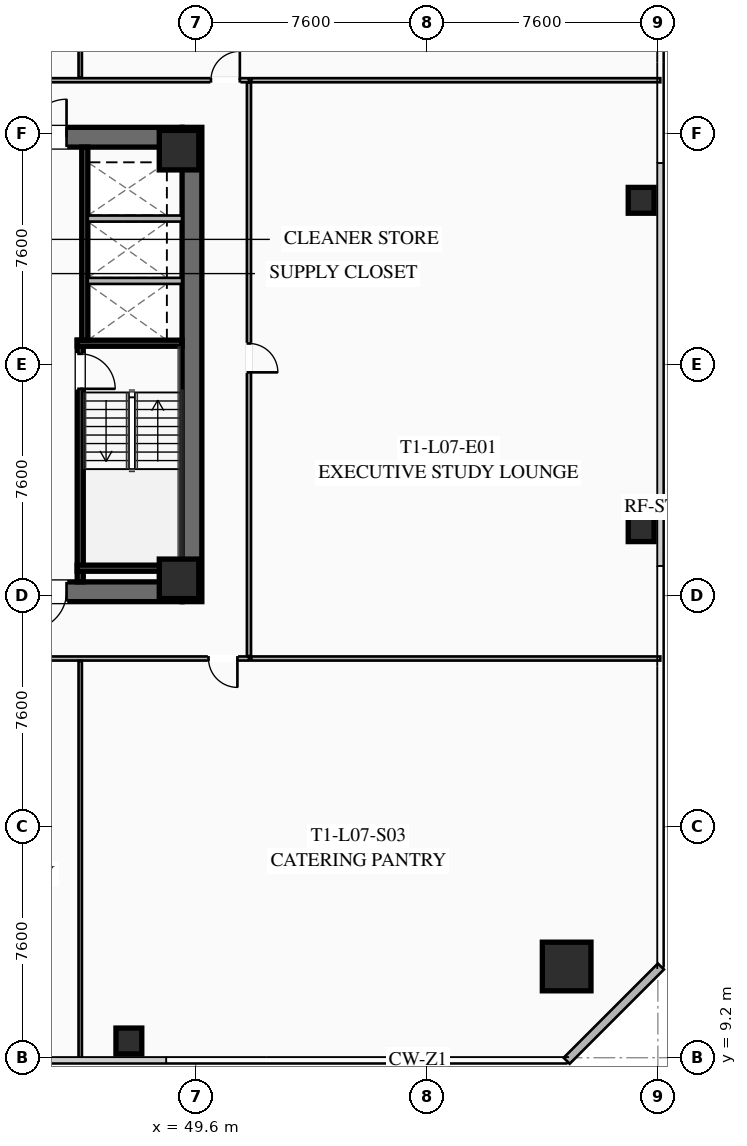
"""IFC4 building model, lengths in metres.
Left out: names, types, materials, properties, quantities, classifications, styles, units other than length and angle.
Written with IfcOpenShell. Run it as: python <this file> out.ifc"""

import sys

from ifc_helpers import new_model, si_unit, direction, frame, frame_2d, origin, origin_2d, place, context, subcontext, project, spatial, rectangle, hollow_rectangle, extrude, element, fill, save


model = new_model("IFC4")
c1 = context("Model", 3, precision=1e-05, world=origin(), true_north=direction((0.0, 1.0)))
c2 = subcontext(c1, "Body", "Model", "MODEL_VIEW")
j1 = project(units=[si_unit("LENGTHUNIT", "METRE"), si_unit("PLANEANGLEUNIT", "RADIAN")], contexts=[c1])
p1 = place(None, origin())
s1 = spatial("IfcSite", under=j1, at=p1, CompositionType="ELEMENT")
p2 = place(p1, origin())
s2 = spatial("IfcBuilding", under=s1, at=p2, CompositionType="ELEMENT")
p3 = place(p2, frame((0.0, 0.0, 31.7)))
s3 = spatial("IfcBuildingStorey", under=s2, at=p3, CompositionType="ELEMENT", Elevation=31.7)
p4 = place(p3, frame((49.475, 39.8, 0.0), z_axis=(0.0, 0.0, 1.0), x_axis=(0.0, -1.0, 0.0)))
e1 = element("IfcWall", 1, at=p4, inside=s3, PredefinedType="SHEAR", context=c2, shape_type="SweptSolid", body=[
    extrude(rectangle(XDim=15.6, YDim=0.65, at=frame_2d((7.8, 0.0))), origin(), (0.0, 0.0, 1.0), 3.55),
])
p5 = place(p3, frame((49.15, 24.525, 0.0), z_axis=(0.0, 0.0, 1.0), x_axis=(-1.0, 0.0, 0.0)))
e2 = element("IfcWall", 2, at=p5, inside=s3, PredefinedType="SHEAR", context=c2, shape_type="SweptSolid", body=[
    extrude(rectangle(XDim=14.3, YDim=0.65, at=frame_2d((7.15, 0.0))), origin(), (0.0, 0.0, 1.0), 3.55),
])
p6 = place(p5, frame((8.85, 0.0, 0.0)))
e3 = element("IfcOpeningElement", 3, at=p6, cuts=e2, PredefinedType="OPENING", context=c2, shape_type="SweptSolid", body=[
    extrude(rectangle(XDim=1.25, YDim=2.25, at=frame_2d((0.625, 1.125))), frame((0.0, 0.335, 0.0), z_axis=(0.0, -1.0, 0.0), x_axis=(1.0, 0.0, 0.0)), (0.0, 0.0, 1.0), 0.67),
])
p7 = place(p5, frame((3.8, 0.0, 0.0)))
e4 = element("IfcOpeningElement", 4, at=p7, cuts=e2, PredefinedType="OPENING", context=c2, shape_type="SweptSolid", body=[
    extrude(rectangle(XDim=1.25, YDim=2.25, at=frame_2d((0.625, 1.125))), frame((0.0, 0.335, 0.0), z_axis=(0.0, -1.0, 0.0), x_axis=(1.0, 0.0, 0.0)), (0.0, 0.0, 1.0), 0.67),
])
p8 = place(p3, frame((34.85, 39.475, 0.0), z_axis=(0.0, 0.0, 1.0), x_axis=(1.0, 0.0, 0.0)))
e5 = element("IfcWall", 5, at=p8, inside=s3, PredefinedType="SHEAR", context=c2, shape_type="SweptSolid", body=[
    extrude(rectangle(XDim=14.3, YDim=0.65, at=frame_2d((7.15, 0.0))), origin(), (0.0, 0.0, 1.0), 3.55),
])
p9 = place(p8, frame((4.2, 0.0, 0.0)))
e6 = element("IfcOpeningElement", 6, at=p9, cuts=e5, PredefinedType="OPENING", context=c2, shape_type="SweptSolid", body=[
    extrude(rectangle(XDim=1.25, YDim=2.25, at=frame_2d((0.625, 1.125))), frame((0.0, 0.335, 0.0), z_axis=(0.0, -1.0, 0.0), x_axis=(1.0, 0.0, 0.0)), (0.0, 0.0, 1.0), 0.67),
])
p10 = place(p8, frame((9.25, 0.0, 0.0)))
e7 = element("IfcOpeningElement", 7, at=p10, cuts=e5, PredefinedType="OPENING", context=c2, shape_type="SweptSolid", body=[
    extrude(rectangle(XDim=1.25, YDim=2.25, at=frame_2d((0.625, 1.125))), frame((0.0, 0.335, 0.0), z_axis=(0.0, -1.0, 0.0), x_axis=(1.0, 0.0, 0.0)), (0.0, 0.0, 1.0), 0.67),
])
for number, where, z_axis, x_axis in (
    (8, (49.05, 24.95, 0.0), (0.0, 0.0, 1.0), (1.0, 0.0, 0.0)),
    (9, (49.05, 39.05, 0.0), (0.0, 0.0, 1.0), (1.0, 0.0, 0.0)),
):
    element("IfcColumn", number, at=place(p3, frame(where, z_axis=z_axis, x_axis=x_axis)), inside=s3, PredefinedType="COLUMN", context=c2, shape_type="SweptSolid", body=[
        extrude(hollow_rectangle(XDim=1.3, YDim=1.3, WallThickness=0.05, at=origin_2d()), origin(), (0.0, 0.0, 1.0), 3.35),
    ])
p11 = place(p3, frame((61.8, 12.2, 0.0), z_axis=(0.0, 0.0, 1.0), x_axis=(1.0, 0.0, 0.0)))
e10 = element("IfcColumn", 10, at=p11, inside=s3, PredefinedType="COLUMN", context=c2, shape_type="SweptSolid", body=[
    extrude(hollow_rectangle(XDim=1.6, YDim=1.6, WallThickness=0.06, at=origin_2d()), origin(), (0.0, 0.0, 1.0), 3.35),
])
for number, where, z_axis, x_axis in (
    (11, (47.4, 9.75, 0.0), (0.0, 0.0, 1.0), (1.0, 0.0, 0.0)),
    (12, (64.25, 26.6, 0.0), (0.0, 0.0, 1.0), (1.0, 0.0, 0.0)),
    (13, (64.25, 37.4, 0.0), (0.0, 0.0, 1.0), (1.0, 0.0, 0.0)),
):
    element("IfcColumn", number, at=place(p3, frame(where, z_axis=z_axis, x_axis=x_axis)), inside=s3, PredefinedType="COLUMN", context=c2, shape_type="SweptSolid", body=[
        extrude(hollow_rectangle(XDim=0.85, YDim=0.85, WallThickness=0.035, at=origin_2d()), origin(), (0.0, 0.0, 1.0), 3.35),
    ])
p12 = place(p3, frame((64.9, 12.2, 0.0), z_axis=(0.0, 0.0, 1.0), x_axis=(-0.707106781187, -0.707106781187, 0.0)))
e14 = element("IfcWall", 14, at=p12, inside=s3, PredefinedType="SOLIDWALL", context=c2, shape_type="SweptSolid", body=[
    extrude(rectangle(XDim=4.384, YDim=0.28, at=frame_2d((2.192, 0.0))), origin(), (0.0, 0.0, 1.0), 3.35),
])
p13 = place(p3, frame((45.8, 32.8, 0.0), z_axis=(0.0, 0.0, 1.0), x_axis=(0.0, -1.0, 0.0)))
e15 = element("IfcWall", 15, at=p13, inside=s3, PredefinedType="SHEAR", context=c2, shape_type="SweptSolid", body=[
    extrude(rectangle(XDim=7.95, YDim=0.2, at=frame_2d((3.975, 0.0))), origin(), (0.0, 0.0, 1.0), 3.35),
])
p14 = place(p13, frame((0.45, 0.0, 0.0)))
e16 = element("IfcOpeningElement", 16, at=p14, cuts=e15, PredefinedType="OPENING", context=c2, shape_type="SweptSolid", body=[
    extrude(rectangle(XDim=1.15, YDim=2.2, at=frame_2d((0.575, 1.1))), frame((0.0, 0.11, 0.0), z_axis=(0.0, -1.0, 0.0), x_axis=(1.0, 0.0, 0.0)), (0.0, 0.0, 1.0), 0.22),
])
for number, where, z_axis, x_axis in (
    (17, (45.7, 32.7, 0.0), (0.0, 0.0, 1.0), (1.0, 0.0, 0.0)),
    (18, (45.7, 25.3, 0.0), (0.0, 0.0, 1.0), (1.0, 0.0, 0.0)),
):
    element("IfcWall", number, at=place(p3, frame(where, z_axis=z_axis, x_axis=x_axis)), inside=s3, PredefinedType="SHEAR", context=c2, shape_type="SweptSolid", body=[
        extrude(rectangle(XDim=3.45, YDim=0.2, at=frame_2d((1.725, 0.0))), origin(), (0.0, 0.0, 1.0), 3.35),
    ])
p15 = place(p3, frame((45.95, 39.15, 0.0), z_axis=(0.0, 0.0, 1.0), x_axis=(0.0, -1.0, 0.0)))
e19 = element("IfcWall", 19, at=p15, inside=s3, PredefinedType="SHEAR", context=c2, shape_type="SweptSolid", body=[
    extrude(rectangle(XDim=6.35, YDim=0.2, at=frame_2d((3.175, 0.0))), origin(), (0.0, 0.0, 1.0), 3.35),
])
for number, where, z_axis, x_axis in (
    (20, (46.05, 34.75, 0.0), (0.0, 0.0, 1.0), (1.0, 0.0, 0.0)),
    (21, (46.05, 36.8, 0.0), (0.0, 0.0, 1.0), (1.0, 0.0, 0.0)),
):
    element("IfcWall", number, at=place(p3, frame(where, z_axis=z_axis, x_axis=x_axis)), inside=s3, PredefinedType="SOLIDWALL", context=c2, shape_type="SweptSolid", body=[
        extrude(rectangle(XDim=3.1, YDim=0.2, at=frame_2d((1.55, 0.0))), origin(), (0.0, 0.0, 1.0), 3.35),
    ])
p16 = place(p3, frame((22.35, 41.35, 0.0), z_axis=(0.0, 0.0, 1.0), x_axis=(1.0, 0.0, 0.0)))
e22 = element("IfcWall", 22, at=p16, inside=s3, PredefinedType="PARTITIONING", context=c2, shape_type="SweptSolid", body=[
    extrude(rectangle(XDim=29.0, YDim=0.135, at=frame_2d((14.5, 0.0))), origin(), (0.0, 0.0, 1.0), 2.703),
])
p17 = place(p16, frame((0.3, 0.0, 0.0)))
e23 = element("IfcOpeningElement", 23, at=p17, cuts=e22, PredefinedType="OPENING", context=c2, shape_type="SweptSolid", body=[
    extrude(rectangle(XDim=0.95, YDim=2.05, at=frame_2d((0.475, 1.025))), frame((0.0, 0.077, 0.0), z_axis=(0.0, -1.0, 0.0), x_axis=(1.0, 0.0, 0.0)), (0.0, 0.0, 1.0), 0.155),
])
p18 = place(p16, frame((19.299, 0.0, 0.0)))
e24 = element("IfcOpeningElement", 24, at=p18, cuts=e22, PredefinedType="OPENING", context=c2, shape_type="SweptSolid", body=[
    extrude(rectangle(XDim=0.95, YDim=2.05, at=frame_2d((0.475, 1.025))), frame((0.0, 0.077, 0.0), z_axis=(0.0, -1.0, 0.0), x_axis=(1.0, 0.0, 0.0)), (0.0, 0.0, 1.0), 0.155),
])
p19 = place(p16, frame((27.75, 0.0, 0.0)))
e25 = element("IfcOpeningElement", 25, at=p19, cuts=e22, PredefinedType="OPENING", context=c2, shape_type="SweptSolid", body=[
    extrude(rectangle(XDim=0.95, YDim=2.05, at=frame_2d((0.475, 1.025))), frame((0.0, 0.077, 0.0), z_axis=(0.0, -1.0, 0.0), x_axis=(1.0, 0.0, 0.0)), (0.0, 0.0, 1.0), 0.155),
])
p20 = place(p3, frame((45.8, 41.43, 0.0), z_axis=(0.0, 0.0, 1.0), x_axis=(0.0, 1.0, 0.0)))
e26 = element("IfcWall", 26, at=p20, inside=s3, PredefinedType="PARTITIONING", context=c2, shape_type="SweptSolid", body=[
    extrude(rectangle(XDim=13.45, YDim=0.11, at=frame_2d((6.725, 0.0))), origin(), (0.0, 0.0, 1.0), 2.703),
])
p21 = place(p3, frame((51.35, 22.33, 0.0), z_axis=(0.0, 0.0, 1.0), x_axis=(-1.0, 0.0, 0.0)))
e27 = element("IfcWall", 27, at=p21, inside=s3, PredefinedType="PARTITIONING", context=c2, shape_type="SweptSolid", body=[
    extrude(rectangle(XDim=29.0, YDim=0.135, at=frame_2d((14.5, 0.0))), origin(), (0.0, 0.0, 1.0), 2.703),
])
p22 = place(p21, frame((27.67, 0.0, 0.0)))
e28 = element("IfcOpeningElement", 28, at=p22, cuts=e27, PredefinedType="OPENING", context=c2, shape_type="SweptSolid", body=[
    extrude(rectangle(XDim=0.95, YDim=2.05, at=frame_2d((0.475, 1.025))), frame((0.0, 0.077, 0.0), z_axis=(0.0, -1.0, 0.0), x_axis=(1.0, 0.0, 0.0)), (0.0, 0.0, 1.0), 0.155),
])
p23 = place(p21, frame((8.775, 0.0, 0.0)))
e29 = element("IfcOpeningElement", 29, at=p23, cuts=e27, PredefinedType="OPENING", context=c2, shape_type="SweptSolid", body=[
    extrude(rectangle(XDim=0.95, YDim=2.05, at=frame_2d((0.475, 1.025))), frame((0.0, 0.077, 0.0), z_axis=(0.0, -1.0, 0.0), x_axis=(1.0, 0.0, 0.0)), (0.0, 0.0, 1.0), 0.155),
])
p24 = place(p21, frame((0.38, 0.0, 0.0)))
e30 = element("IfcOpeningElement", 30, at=p24, cuts=e27, PredefinedType="OPENING", context=c2, shape_type="SweptSolid", body=[
    extrude(rectangle(XDim=0.95, YDim=2.05, at=frame_2d((0.475, 1.025))), frame((0.0, 0.077, 0.0), z_axis=(0.0, -1.0, 0.0), x_axis=(1.0, 0.0, 0.0)), (0.0, 0.0, 1.0), 0.155),
])
p25 = place(p3, frame((45.8, 9.12, 0.0), z_axis=(0.0, 0.0, 1.0), x_axis=(0.0, 1.0, 0.0)))
e31 = element("IfcWall", 31, at=p25, inside=s3, PredefinedType="PARTITIONING", context=c2, shape_type="SweptSolid", body=[
    extrude(rectangle(XDim=13.13, YDim=0.11, at=frame_2d((6.565, 0.0))), origin(), (0.0, 0.0, 1.0), 2.703),
])
p26 = place(p3, frame((51.35, 41.27, 0.0), z_axis=(0.0, 0.0, 1.0), x_axis=(0.0, -1.0, 0.0)))
e32 = element("IfcWall", 32, at=p26, inside=s3, PredefinedType="PARTITIONING", context=c2, shape_type="SweptSolid", body=[
    extrude(rectangle(XDim=18.86, YDim=0.135, at=frame_2d((9.43, 0.0))), origin(), (0.0, 0.0, 1.0), 2.703),
])
p27 = place(p26, frame((8.579, 0.0, 0.0)))
e33 = element("IfcOpeningElement", 33, at=p27, cuts=e32, PredefinedType="OPENING", context=c2, shape_type="SweptSolid", body=[
    extrude(rectangle(XDim=0.95, YDim=2.05, at=frame_2d((0.475, 1.025))), frame((0.0, 0.077, 0.0), z_axis=(0.0, -1.0, 0.0), x_axis=(1.0, 0.0, 0.0)), (0.0, 0.0, 1.0), 0.155),
])
for number, where, z_axis, x_axis in (
    (34, (64.88, 41.35, 0.0), (0.0, 0.0, 1.0), (-1.0, 0.0, 0.0)),
    (35, (51.43, 22.33, 0.0), (0.0, 0.0, 1.0), (1.0, 0.0, 0.0)),
):
    element("IfcWall", number, at=place(p3, frame(where, z_axis=z_axis, x_axis=x_axis)), inside=s3, PredefinedType="PARTITIONING", context=c2, shape_type="SweptSolid", body=[
        extrude(rectangle(XDim=13.45, YDim=0.135, at=frame_2d((6.725, 0.0))), origin(), (0.0, 0.0, 1.0), 2.703),
    ])
p28 = place(p10, origin())
e36 = element("IfcDoor", 36, at=p28, inside=s3, OperationType="SINGLE_SWING_RIGHT", PredefinedType="DOOR", context=c2, shape_type="SweptSolid", body=[
    extrude(rectangle(XDim=1.25, YDim=2.25, at=frame_2d((0.625, 1.125))), frame((0.0, 0.025, 0.0), z_axis=(0.0, -1.0, 0.0), x_axis=(1.0, 0.0, 0.0)), (0.0, 0.0, 1.0), 0.05),
])
fill(e7, e36)
p29 = place(p7, origin())
e37 = element("IfcDoor", 37, at=p29, inside=s3, OperationType="SINGLE_SWING_RIGHT", PredefinedType="DOOR", context=c2, shape_type="SweptSolid", body=[
    extrude(rectangle(XDim=1.25, YDim=2.25, at=frame_2d((0.625, 1.125))), frame((0.0, 0.025, 0.0), z_axis=(0.0, -1.0, 0.0), x_axis=(1.0, 0.0, 0.0)), (0.0, 0.0, 1.0), 0.05),
])
fill(e4, e37)
p30 = place(p14, origin())
e38 = element("IfcDoor", 38, at=p30, inside=s3, OperationType="SINGLE_SWING_RIGHT", PredefinedType="DOOR", context=c2, shape_type="SweptSolid", body=[
    extrude(rectangle(XDim=1.15, YDim=2.2, at=frame_2d((0.575, 1.1))), frame((0.0, 0.025, 0.0), z_axis=(0.0, -1.0, 0.0), x_axis=(1.0, 0.0, 0.0)), (0.0, 0.0, 1.0), 0.05),
])
fill(e16, e38)
p31 = place(p19, origin())
e39 = element("IfcDoor", 39, at=p31, inside=s3, OperationType="SINGLE_SWING_RIGHT", PredefinedType="DOOR", context=c2, shape_type="SweptSolid", body=[
    extrude(rectangle(XDim=0.95, YDim=2.05, at=frame_2d((0.475, 1.025))), frame((0.0, 0.025, 0.0), z_axis=(0.0, -1.0, 0.0), x_axis=(1.0, 0.0, 0.0)), (0.0, 0.0, 1.0), 0.05),
])
fill(e25, e39)
p32 = place(p24, origin())
e40 = element("IfcDoor", 40, at=p32, inside=s3, OperationType="SINGLE_SWING_LEFT", PredefinedType="DOOR", context=c2, shape_type="SweptSolid", body=[
    extrude(rectangle(XDim=0.95, YDim=2.05, at=frame_2d((0.475, 1.025))), frame((0.0, 0.025, 0.0), z_axis=(0.0, -1.0, 0.0), x_axis=(1.0, 0.0, 0.0)), (0.0, 0.0, 1.0), 0.05),
])
fill(e30, e40)
p33 = place(p27, origin())
e41 = element("IfcDoor", 41, at=p33, inside=s3, OperationType="SINGLE_SWING_RIGHT", PredefinedType="DOOR", context=c2, shape_type="SweptSolid", body=[
    extrude(rectangle(XDim=0.95, YDim=2.05, at=frame_2d((0.475, 1.025))), frame((0.0, 0.025, 0.0), z_axis=(0.0, -1.0, 0.0), x_axis=(1.0, 0.0, 0.0)), (0.0, 0.0, 1.0), 0.05),
])
fill(e33, e41)
save(model, sys.argv[1])
